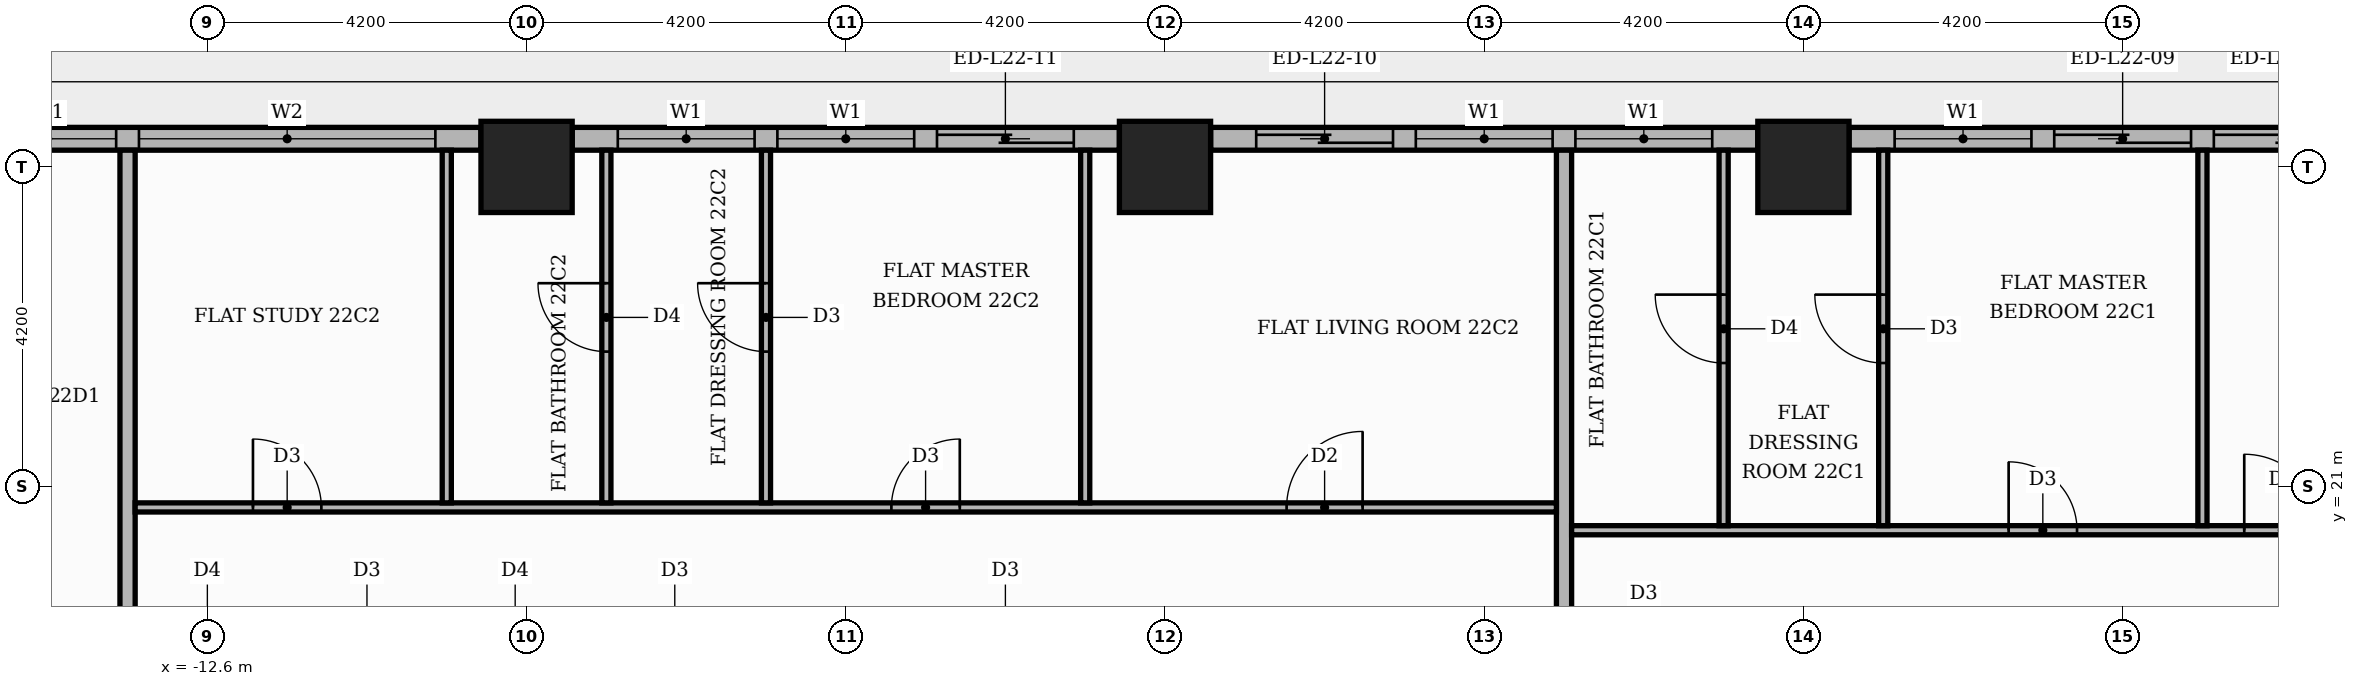
"""IFC4 building model, lengths in metres.
Left out: names, types, materials, properties, quantities, classifications, styles, units other than length and angle.
Written with IfcOpenShell. Run it as: python <this file> out.ifc"""

import sys

from ifc_helpers import new_model, si_unit, direction, frame, frame_2d, origin, origin_2d, place, context, subcontext, project, spatial, rectangle, extrude, element, fill, save


model = new_model("IFC4")
c1 = context("Model", 3, precision=1e-05, world=origin(), true_north=direction((0.0, 1.0)))
c2 = subcontext(c1, "Body", "Model", "MODEL_VIEW")
j1 = project(units=[si_unit("LENGTHUNIT", "METRE"), si_unit("PLANEANGLEUNIT", "RADIAN")], contexts=[c1])
p1 = place(None, origin())
s1 = spatial("IfcSite", under=j1, at=p1, CompositionType="ELEMENT")
p2 = place(p1, origin())
s2 = spatial("IfcBuilding", under=s1, at=p2, CompositionType="ELEMENT")
p3 = place(p2, frame((0.0, 0.0, 94.8)))
s3 = spatial("IfcBuildingStorey", under=s2, at=p3, CompositionType="ELEMENT", Elevation=94.8)
for number, where, z_axis, x_axis in (
    (1, (0.0, 25.2, 0.0), (0.0, 0.0, 1.0), (1.0, 0.0, 0.0)),
    (2, (-8.4, 25.2, 0.0), (0.0, 0.0, 1.0), (1.0, 0.0, 0.0)),
    (3, (8.4, 25.2, 0.0), (0.0, 0.0, 1.0), (1.0, 0.0, 0.0)),
):
    element("IfcColumn", number, at=place(p3, frame(where, z_axis=z_axis, x_axis=x_axis)), inside=s3, PredefinedType="COLUMN", context=c2, shape_type="SweptSolid", body=[
        extrude(rectangle(XDim=1.2, YDim=1.2, at=origin_2d()), origin(), (0.0, 0.0, 1.0), 3.9),
    ])
p4 = place(p3, frame((16.2, 25.57, 0.0), z_axis=(0.0, 0.0, 1.0), x_axis=(-1.0, 0.0, 0.0)))
e4 = element("IfcWall", 4, at=p4, inside=s3, PredefinedType="STANDARD", context=c2, shape_type="SweptSolid", body=[
    extrude(rectangle(XDim=7.2, YDim=0.3, at=frame_2d((3.6, 0.0))), origin(), (0.0, 0.0, 1.0), 3.48),
])
p5 = place(p4, frame((0.6, 0.0, 0.0)))
e5 = element("IfcOpeningElement", 5, at=p5, cuts=e4, PredefinedType="OPENING", context=c2, shape_type="SweptSolid", body=[
    extrude(rectangle(XDim=1.8, YDim=2.4, at=frame_2d((0.9, 1.2))), frame((0.0, 0.16, 0.0), z_axis=(0.0, -1.0, 0.0), x_axis=(1.0, 0.0, 0.0)), (0.0, 0.0, 1.0), 0.32),
])
p6 = place(p4, frame((2.7, 0.0, 0.0)))
e6 = element("IfcOpeningElement", 6, at=p6, cuts=e4, PredefinedType="OPENING", context=c2, shape_type="SweptSolid", body=[
    extrude(rectangle(XDim=1.8, YDim=2.4, at=frame_2d((0.9, 1.2))), frame((0.0, 0.16, 0.0), z_axis=(0.0, -1.0, 0.0), x_axis=(1.0, 0.0, 0.0)), (0.0, 0.0, 1.0), 0.32),
])
p7 = place(p4, frame((4.8, 0.0, 0.9)))
e7 = element("IfcOpeningElement", 7, at=p7, cuts=e4, PredefinedType="OPENING", context=c2, shape_type="SweptSolid", body=[
    extrude(rectangle(XDim=1.8, YDim=2.1, at=frame_2d((0.9, 1.05))), frame((0.0, 0.16, 0.0), z_axis=(0.0, -1.0, 0.0), x_axis=(1.0, 0.0, 0.0)), (0.0, 0.0, 1.0), 0.32),
])
p8 = place(p3, frame((7.8, 25.57, 0.0), z_axis=(0.0, 0.0, 1.0), x_axis=(-1.0, 0.0, 0.0)))
e8 = element("IfcWall", 8, at=p8, inside=s3, PredefinedType="STANDARD", context=c2, shape_type="SweptSolid", body=[
    extrude(rectangle(XDim=7.2, YDim=0.3, at=frame_2d((3.6, 0.0))), origin(), (0.0, 0.0, 1.0), 3.48),
])
p9 = place(p8, frame((0.6, 0.0, 0.9)))
e9 = element("IfcOpeningElement", 9, at=p9, cuts=e8, PredefinedType="OPENING", context=c2, shape_type="SweptSolid", body=[
    extrude(rectangle(XDim=1.8, YDim=2.1, at=frame_2d((0.9, 1.05))), frame((0.0, 0.16, 0.0), z_axis=(0.0, -1.0, 0.0), x_axis=(1.0, 0.0, 0.0)), (0.0, 0.0, 1.0), 0.32),
])
p10 = place(p8, frame((2.7, 0.0, 0.9)))
e10 = element("IfcOpeningElement", 10, at=p10, cuts=e8, PredefinedType="OPENING", context=c2, shape_type="SweptSolid", body=[
    extrude(rectangle(XDim=1.8, YDim=2.1, at=frame_2d((0.9, 1.05))), frame((0.0, 0.16, 0.0), z_axis=(0.0, -1.0, 0.0), x_axis=(1.0, 0.0, 0.0)), (0.0, 0.0, 1.0), 0.32),
])
p11 = place(p8, frame((4.8, 0.0, 0.0)))
e11 = element("IfcOpeningElement", 11, at=p11, cuts=e8, PredefinedType="OPENING", context=c2, shape_type="SweptSolid", body=[
    extrude(rectangle(XDim=1.8, YDim=2.4, at=frame_2d((0.9, 1.2))), frame((0.0, 0.16, 0.0), z_axis=(0.0, -1.0, 0.0), x_axis=(1.0, 0.0, 0.0)), (0.0, 0.0, 1.0), 0.32),
])
p12 = place(p3, frame((-0.6, 25.57, 0.0), z_axis=(0.0, 0.0, 1.0), x_axis=(-1.0, 0.0, 0.0)))
e12 = element("IfcWall", 12, at=p12, inside=s3, PredefinedType="STANDARD", context=c2, shape_type="SweptSolid", body=[
    extrude(rectangle(XDim=7.2, YDim=0.3, at=frame_2d((3.6, 0.0))), origin(), (0.0, 0.0, 1.0), 3.48),
])
p13 = place(p12, frame((0.6, 0.0, 0.0)))
e13 = element("IfcOpeningElement", 13, at=p13, cuts=e12, PredefinedType="OPENING", context=c2, shape_type="SweptSolid", body=[
    extrude(rectangle(XDim=1.8, YDim=2.4, at=frame_2d((0.9, 1.2))), frame((0.0, 0.16, 0.0), z_axis=(0.0, -1.0, 0.0), x_axis=(1.0, 0.0, 0.0)), (0.0, 0.0, 1.0), 0.32),
])
p14 = place(p12, frame((2.7, 0.0, 0.9)))
e14 = element("IfcOpeningElement", 14, at=p14, cuts=e12, PredefinedType="OPENING", context=c2, shape_type="SweptSolid", body=[
    extrude(rectangle(XDim=1.8, YDim=2.1, at=frame_2d((0.9, 1.05))), frame((0.0, 0.16, 0.0), z_axis=(0.0, -1.0, 0.0), x_axis=(1.0, 0.0, 0.0)), (0.0, 0.0, 1.0), 0.32),
])
p15 = place(p12, frame((4.8, 0.0, 0.9)))
e15 = element("IfcOpeningElement", 15, at=p15, cuts=e12, PredefinedType="OPENING", context=c2, shape_type="SweptSolid", body=[
    extrude(rectangle(XDim=1.8, YDim=2.1, at=frame_2d((0.9, 1.05))), frame((0.0, 0.16, 0.0), z_axis=(0.0, -1.0, 0.0), x_axis=(1.0, 0.0, 0.0)), (0.0, 0.0, 1.0), 0.32),
])
p16 = place(p3, frame((-9.0, 25.57, 0.0), z_axis=(0.0, 0.0, 1.0), x_axis=(-1.0, 0.0, 0.0)))
e16 = element("IfcWall", 16, at=p16, inside=s3, PredefinedType="STANDARD", context=c2, shape_type="SweptSolid", body=[
    extrude(rectangle(XDim=7.2, YDim=0.3, at=frame_2d((3.6, 0.0))), origin(), (0.0, 0.0, 1.0), 3.48),
])
p17 = place(p16, frame((0.6, 0.0, 0.9)))
e17 = element("IfcOpeningElement", 17, at=p17, cuts=e16, PredefinedType="OPENING", context=c2, shape_type="SweptSolid", body=[
    extrude(rectangle(XDim=3.9, YDim=2.1, at=frame_2d((1.95, 1.05))), frame((0.0, 0.16, 0.0), z_axis=(0.0, -1.0, 0.0), x_axis=(1.0, 0.0, 0.0)), (0.0, 0.0, 1.0), 0.32),
])
p18 = place(p16, frame((4.8, 0.0, 0.9)))
e18 = element("IfcOpeningElement", 18, at=p18, cuts=e16, PredefinedType="OPENING", context=c2, shape_type="SweptSolid", body=[
    extrude(rectangle(XDim=1.8, YDim=2.1, at=frame_2d((0.9, 1.05))), frame((0.0, 0.16, 0.0), z_axis=(0.0, -1.0, 0.0), x_axis=(1.0, 0.0, 0.0)), (0.0, 0.0, 1.0), 0.32),
])
for number, where, z_axis, x_axis in (
    (19, (-13.65, 13.75, 0.0), (0.0, 0.0, 1.0), (0.0, 1.0, 0.0)),
    (20, (5.25, 13.75, 0.0), (0.0, 0.0, 1.0), (0.0, 1.0, 0.0)),
):
    element("IfcWall", number, at=place(p3, frame(where, z_axis=z_axis, x_axis=x_axis)), inside=s3, PredefinedType="PARTITIONING", context=c2, shape_type="SweptSolid", body=[
        extrude(rectangle(XDim=11.67, YDim=0.2, at=frame_2d((5.835, 0.0))), origin(), (0.0, 0.0, 1.0), 3.48),
    ])
p19 = place(p3, frame((5.35, 20.42, 0.0), z_axis=(0.0, 0.0, 1.0), x_axis=(1.0, 0.0, 0.0)))
e21 = element("IfcWall", 21, at=p19, inside=s3, PredefinedType="PARTITIONING", context=c2, shape_type="SweptSolid", body=[
    extrude(rectangle(XDim=20.07, YDim=0.12, at=frame_2d((10.035, 0.0))), origin(), (0.0, 0.0, 1.0), 3.48),
])
p20 = place(p19, frame((8.85, 0.0, 0.0)))
e22 = element("IfcOpeningElement", 22, at=p20, cuts=e21, PredefinedType="OPENING", context=c2, shape_type="SweptSolid", body=[
    extrude(rectangle(XDim=1.0, YDim=2.1, at=frame_2d((0.5, 1.05))), frame((0.0, 0.07, 0.0), z_axis=(0.0, -1.0, 0.0), x_axis=(1.0, 0.0, 0.0)), (0.0, 0.0, 1.0), 0.14),
])
p21 = place(p19, frame((5.75, 0.0, 0.0)))
e23 = element("IfcOpeningElement", 23, at=p21, cuts=e21, PredefinedType="OPENING", context=c2, shape_type="SweptSolid", body=[
    extrude(rectangle(XDim=0.9, YDim=2.1, at=frame_2d((0.45, 1.05))), frame((0.0, 0.07, 0.0), z_axis=(0.0, -1.0, 0.0), x_axis=(1.0, 0.0, 0.0)), (0.0, 0.0, 1.0), 0.14),
])
p22 = place(p3, frame((7.35, 20.48, 0.0), z_axis=(0.0, 0.0, 1.0), x_axis=(0.0, 1.0, 0.0)))
e24 = element("IfcWall", 24, at=p22, inside=s3, PredefinedType="PARTITIONING", context=c2, shape_type="SweptSolid", body=[
    extrude(rectangle(XDim=4.94, YDim=0.12, at=frame_2d((2.47, 0.0))), origin(), (0.0, 0.0, 1.0), 3.48),
])
p23 = place(p22, frame((2.14, 0.0, 0.0)))
e25 = element("IfcOpeningElement", 25, at=p23, cuts=e24, PredefinedType="OPENING", context=c2, shape_type="SweptSolid", body=[
    extrude(rectangle(XDim=0.9, YDim=2.1, at=frame_2d((0.45, 1.05))), frame((0.0, 0.07, 0.0), z_axis=(0.0, -1.0, 0.0), x_axis=(1.0, 0.0, 0.0)), (0.0, 0.0, 1.0), 0.14),
])
p24 = place(p3, frame((9.45, 20.48, 0.0), z_axis=(0.0, 0.0, 1.0), x_axis=(0.0, 1.0, 0.0)))
e26 = element("IfcWall", 26, at=p24, inside=s3, PredefinedType="PARTITIONING", context=c2, shape_type="SweptSolid", body=[
    extrude(rectangle(XDim=4.94, YDim=0.12, at=frame_2d((2.47, 0.0))), origin(), (0.0, 0.0, 1.0), 3.48),
])
p25 = place(p24, frame((2.14, 0.0, 0.0)))
e27 = element("IfcOpeningElement", 27, at=p25, cuts=e26, PredefinedType="OPENING", context=c2, shape_type="SweptSolid", body=[
    extrude(rectangle(XDim=0.9, YDim=2.1, at=frame_2d((0.45, 1.05))), frame((0.0, 0.07, 0.0), z_axis=(0.0, -1.0, 0.0), x_axis=(1.0, 0.0, 0.0)), (0.0, 0.0, 1.0), 0.14),
])
p26 = place(p3, frame((13.65, 20.48, 0.0), z_axis=(0.0, 0.0, 1.0), x_axis=(0.0, 1.0, 0.0)))
e28 = element("IfcWall", 28, at=p26, inside=s3, PredefinedType="PARTITIONING", context=c2, shape_type="SweptSolid", body=[
    extrude(rectangle(XDim=4.94, YDim=0.12, at=frame_2d((2.47, 0.0))), origin(), (0.0, 0.0, 1.0), 3.48),
])
p27 = place(p3, frame((-13.55, 20.72, 0.0), z_axis=(0.0, 0.0, 1.0), x_axis=(1.0, 0.0, 0.0)))
e29 = element("IfcWall", 29, at=p27, inside=s3, PredefinedType="PARTITIONING", context=c2, shape_type="SweptSolid", body=[
    extrude(rectangle(XDim=18.7, YDim=0.12, at=frame_2d((9.35, 0.0))), origin(), (0.0, 0.0, 1.0), 3.48),
])
p28 = place(p27, frame((15.15, 0.0, 0.0)))
e30 = element("IfcOpeningElement", 30, at=p28, cuts=e29, PredefinedType="OPENING", context=c2, shape_type="SweptSolid", body=[
    extrude(rectangle(XDim=1.0, YDim=2.1, at=frame_2d((0.5, 1.05))), frame((0.0, 0.07, 0.0), z_axis=(0.0, -1.0, 0.0), x_axis=(1.0, 0.0, 0.0)), (0.0, 0.0, 1.0), 0.14),
])
p29 = place(p27, frame((9.95, 0.0, 0.0)))
e31 = element("IfcOpeningElement", 31, at=p29, cuts=e29, PredefinedType="OPENING", context=c2, shape_type="SweptSolid", body=[
    extrude(rectangle(XDim=0.9, YDim=2.1, at=frame_2d((0.45, 1.05))), frame((0.0, 0.07, 0.0), z_axis=(0.0, -1.0, 0.0), x_axis=(1.0, 0.0, 0.0)), (0.0, 0.0, 1.0), 0.14),
])
p30 = place(p27, frame((1.55, 0.0, 0.0)))
e32 = element("IfcOpeningElement", 32, at=p30, cuts=e29, PredefinedType="OPENING", context=c2, shape_type="SweptSolid", body=[
    extrude(rectangle(XDim=0.9, YDim=2.1, at=frame_2d((0.45, 1.05))), frame((0.0, 0.07, 0.0), z_axis=(0.0, -1.0, 0.0), x_axis=(1.0, 0.0, 0.0)), (0.0, 0.0, 1.0), 0.14),
])
p31 = place(p3, frame((-9.45, 20.78, 0.0), z_axis=(0.0, 0.0, 1.0), x_axis=(0.0, 1.0, 0.0)))
e33 = element("IfcWall", 33, at=p31, inside=s3, PredefinedType="PARTITIONING", context=c2, shape_type="SweptSolid", body=[
    extrude(rectangle(XDim=4.64, YDim=0.12, at=frame_2d((2.32, 0.0))), origin(), (0.0, 0.0, 1.0), 3.48),
])
p32 = place(p3, frame((-7.35, 20.78, 0.0), z_axis=(0.0, 0.0, 1.0), x_axis=(0.0, 1.0, 0.0)))
e34 = element("IfcWall", 34, at=p32, inside=s3, PredefinedType="PARTITIONING", context=c2, shape_type="SweptSolid", body=[
    extrude(rectangle(XDim=4.64, YDim=0.12, at=frame_2d((2.32, 0.0))), origin(), (0.0, 0.0, 1.0), 3.48),
])
p33 = place(p32, frame((1.99, 0.0, 0.0)))
e35 = element("IfcOpeningElement", 35, at=p33, cuts=e34, PredefinedType="OPENING", context=c2, shape_type="SweptSolid", body=[
    extrude(rectangle(XDim=0.9, YDim=2.1, at=frame_2d((0.45, 1.05))), frame((0.0, 0.07, 0.0), z_axis=(0.0, -1.0, 0.0), x_axis=(1.0, 0.0, 0.0)), (0.0, 0.0, 1.0), 0.14),
])
p34 = place(p3, frame((-5.25, 20.78, 0.0), z_axis=(0.0, 0.0, 1.0), x_axis=(0.0, 1.0, 0.0)))
e36 = element("IfcWall", 36, at=p34, inside=s3, PredefinedType="PARTITIONING", context=c2, shape_type="SweptSolid", body=[
    extrude(rectangle(XDim=4.64, YDim=0.12, at=frame_2d((2.32, 0.0))), origin(), (0.0, 0.0, 1.0), 3.48),
])
p35 = place(p34, frame((1.99, 0.0, 0.0)))
e37 = element("IfcOpeningElement", 37, at=p35, cuts=e36, PredefinedType="OPENING", context=c2, shape_type="SweptSolid", body=[
    extrude(rectangle(XDim=0.9, YDim=2.1, at=frame_2d((0.45, 1.05))), frame((0.0, 0.07, 0.0), z_axis=(0.0, -1.0, 0.0), x_axis=(1.0, 0.0, 0.0)), (0.0, 0.0, 1.0), 0.14),
])
p36 = place(p3, frame((-1.05, 20.78, 0.0), z_axis=(0.0, 0.0, 1.0), x_axis=(0.0, 1.0, 0.0)))
e38 = element("IfcWall", 38, at=p36, inside=s3, PredefinedType="PARTITIONING", context=c2, shape_type="SweptSolid", body=[
    extrude(rectangle(XDim=4.64, YDim=0.12, at=frame_2d((2.32, 0.0))), origin(), (0.0, 0.0, 1.0), 3.48),
])
p37 = place(p5, origin())
e39 = element("IfcDoor", 39, at=p37, inside=s3, OperationType="SLIDING_TO_LEFT", PredefinedType="DOOR", context=c2, shape_type="SweptSolid", body=[
    extrude(rectangle(XDim=1.8, YDim=2.4, at=frame_2d((0.9, 1.2))), frame((0.0, 0.025, 0.0), z_axis=(0.0, -1.0, 0.0), x_axis=(1.0, 0.0, 0.0)), (0.0, 0.0, 1.0), 0.05),
])
fill(e5, e39)
p38 = place(p6, origin())
e40 = element("IfcDoor", 40, at=p38, inside=s3, OperationType="SLIDING_TO_RIGHT", PredefinedType="DOOR", context=c2, shape_type="SweptSolid", body=[
    extrude(rectangle(XDim=1.8, YDim=2.4, at=frame_2d((0.9, 1.2))), frame((0.0, 0.025, 0.0), z_axis=(0.0, -1.0, 0.0), x_axis=(1.0, 0.0, 0.0)), (0.0, 0.0, 1.0), 0.05),
])
fill(e6, e40)
p39 = place(p7, origin())
e41 = element("IfcWindow", 41, at=p39, inside=s3, PartitioningType="SINGLE_PANEL", PredefinedType="WINDOW", context=c2, shape_type="SweptSolid", body=[
    extrude(rectangle(XDim=1.8, YDim=2.1, at=frame_2d((0.9, 1.05))), frame((0.0, 0.03, 0.0), z_axis=(0.0, -1.0, 0.0), x_axis=(1.0, 0.0, 0.0)), (0.0, 0.0, 1.0), 0.06),
])
fill(e7, e41)
p40 = place(p9, origin())
e42 = element("IfcWindow", 42, at=p40, inside=s3, PartitioningType="SINGLE_PANEL", PredefinedType="WINDOW", context=c2, shape_type="SweptSolid", body=[
    extrude(rectangle(XDim=1.8, YDim=2.1, at=frame_2d((0.9, 1.05))), frame((0.0, 0.03, 0.0), z_axis=(0.0, -1.0, 0.0), x_axis=(1.0, 0.0, 0.0)), (0.0, 0.0, 1.0), 0.06),
])
fill(e9, e42)
p41 = place(p10, origin())
e43 = element("IfcWindow", 43, at=p41, inside=s3, PartitioningType="SINGLE_PANEL", PredefinedType="WINDOW", context=c2, shape_type="SweptSolid", body=[
    extrude(rectangle(XDim=1.8, YDim=2.1, at=frame_2d((0.9, 1.05))), frame((0.0, 0.03, 0.0), z_axis=(0.0, -1.0, 0.0), x_axis=(1.0, 0.0, 0.0)), (0.0, 0.0, 1.0), 0.06),
])
fill(e10, e43)
p42 = place(p11, origin())
e44 = element("IfcDoor", 44, at=p42, inside=s3, OperationType="SLIDING_TO_RIGHT", PredefinedType="DOOR", context=c2, shape_type="SweptSolid", body=[
    extrude(rectangle(XDim=1.8, YDim=2.4, at=frame_2d((0.9, 1.2))), frame((0.0, 0.025, 0.0), z_axis=(0.0, -1.0, 0.0), x_axis=(1.0, 0.0, 0.0)), (0.0, 0.0, 1.0), 0.05),
])
fill(e11, e44)
p43 = place(p13, origin())
e45 = element("IfcDoor", 45, at=p43, inside=s3, OperationType="SLIDING_TO_LEFT", PredefinedType="DOOR", context=c2, shape_type="SweptSolid", body=[
    extrude(rectangle(XDim=1.8, YDim=2.4, at=frame_2d((0.9, 1.2))), frame((0.0, 0.025, 0.0), z_axis=(0.0, -1.0, 0.0), x_axis=(1.0, 0.0, 0.0)), (0.0, 0.0, 1.0), 0.05),
])
fill(e13, e45)
p44 = place(p14, origin())
e46 = element("IfcWindow", 46, at=p44, inside=s3, PartitioningType="SINGLE_PANEL", PredefinedType="WINDOW", context=c2, shape_type="SweptSolid", body=[
    extrude(rectangle(XDim=1.8, YDim=2.1, at=frame_2d((0.9, 1.05))), frame((0.0, 0.03, 0.0), z_axis=(0.0, -1.0, 0.0), x_axis=(1.0, 0.0, 0.0)), (0.0, 0.0, 1.0), 0.06),
])
fill(e14, e46)
p45 = place(p15, origin())
e47 = element("IfcWindow", 47, at=p45, inside=s3, PartitioningType="SINGLE_PANEL", PredefinedType="WINDOW", context=c2, shape_type="SweptSolid", body=[
    extrude(rectangle(XDim=1.8, YDim=2.1, at=frame_2d((0.9, 1.05))), frame((0.0, 0.03, 0.0), z_axis=(0.0, -1.0, 0.0), x_axis=(1.0, 0.0, 0.0)), (0.0, 0.0, 1.0), 0.06),
])
fill(e15, e47)
p46 = place(p17, origin())
e48 = element("IfcWindow", 48, at=p46, inside=s3, PartitioningType="SINGLE_PANEL", PredefinedType="WINDOW", context=c2, shape_type="SweptSolid", body=[
    extrude(rectangle(XDim=3.9, YDim=2.1, at=frame_2d((1.95, 1.05))), frame((0.0, 0.03, 0.0), z_axis=(0.0, -1.0, 0.0), x_axis=(1.0, 0.0, 0.0)), (0.0, 0.0, 1.0), 0.06),
])
fill(e17, e48)
p47 = place(p18, origin())
e49 = element("IfcWindow", 49, at=p47, inside=s3, PartitioningType="SINGLE_PANEL", PredefinedType="WINDOW", context=c2, shape_type="SweptSolid", body=[
    extrude(rectangle(XDim=1.8, YDim=2.1, at=frame_2d((0.9, 1.05))), frame((0.0, 0.03, 0.0), z_axis=(0.0, -1.0, 0.0), x_axis=(1.0, 0.0, 0.0)), (0.0, 0.0, 1.0), 0.06),
])
fill(e18, e49)
p48 = place(p20, origin())
e50 = element("IfcDoor", 50, at=p48, inside=s3, OperationType="SINGLE_SWING_LEFT", PredefinedType="DOOR", context=c2, shape_type="SweptSolid", body=[
    extrude(rectangle(XDim=1.0, YDim=2.1, at=frame_2d((0.5, 1.05))), frame((0.0, 0.025, 0.0), z_axis=(0.0, -1.0, 0.0), x_axis=(1.0, 0.0, 0.0)), (0.0, 0.0, 1.0), 0.05),
])
fill(e22, e50)
p49 = place(p21, origin())
e51 = element("IfcDoor", 51, at=p49, inside=s3, OperationType="SINGLE_SWING_LEFT", PredefinedType="DOOR", context=c2, shape_type="SweptSolid", body=[
    extrude(rectangle(XDim=0.9, YDim=2.1, at=frame_2d((0.45, 1.05))), frame((0.0, 0.025, 0.0), z_axis=(0.0, -1.0, 0.0), x_axis=(1.0, 0.0, 0.0)), (0.0, 0.0, 1.0), 0.05),
])
fill(e23, e51)
p50 = place(p25, origin())
e52 = element("IfcDoor", 52, at=p50, inside=s3, OperationType="SINGLE_SWING_RIGHT", PredefinedType="DOOR", context=c2, shape_type="SweptSolid", body=[
    extrude(rectangle(XDim=0.9, YDim=2.1, at=frame_2d((0.45, 1.05))), frame((0.0, 0.025, 0.0), z_axis=(0.0, -1.0, 0.0), x_axis=(1.0, 0.0, 0.0)), (0.0, 0.0, 1.0), 0.05),
])
fill(e27, e52)
p51 = place(p23, origin())
e53 = element("IfcDoor", 53, at=p51, inside=s3, OperationType="SINGLE_SWING_RIGHT", PredefinedType="DOOR", context=c2, shape_type="SweptSolid", body=[
    extrude(rectangle(XDim=0.9, YDim=2.1, at=frame_2d((0.45, 1.05))), frame((0.0, 0.025, 0.0), z_axis=(0.0, -1.0, 0.0), x_axis=(1.0, 0.0, 0.0)), (0.0, 0.0, 1.0), 0.05),
])
fill(e25, e53)
p52 = place(p28, origin())
e54 = element("IfcDoor", 54, at=p52, inside=s3, OperationType="SINGLE_SWING_RIGHT", PredefinedType="DOOR", context=c2, shape_type="SweptSolid", body=[
    extrude(rectangle(XDim=1.0, YDim=2.1, at=frame_2d((0.5, 1.05))), frame((0.0, 0.025, 0.0), z_axis=(0.0, -1.0, 0.0), x_axis=(1.0, 0.0, 0.0)), (0.0, 0.0, 1.0), 0.05),
])
fill(e30, e54)
p53 = place(p29, origin())
e55 = element("IfcDoor", 55, at=p53, inside=s3, OperationType="SINGLE_SWING_RIGHT", PredefinedType="DOOR", context=c2, shape_type="SweptSolid", body=[
    extrude(rectangle(XDim=0.9, YDim=2.1, at=frame_2d((0.45, 1.05))), frame((0.0, 0.025, 0.0), z_axis=(0.0, -1.0, 0.0), x_axis=(1.0, 0.0, 0.0)), (0.0, 0.0, 1.0), 0.05),
])
fill(e31, e55)
p54 = place(p35, origin())
e56 = element("IfcDoor", 56, at=p54, inside=s3, OperationType="SINGLE_SWING_RIGHT", PredefinedType="DOOR", context=c2, shape_type="SweptSolid", body=[
    extrude(rectangle(XDim=0.9, YDim=2.1, at=frame_2d((0.45, 1.05))), frame((0.0, 0.025, 0.0), z_axis=(0.0, -1.0, 0.0), x_axis=(1.0, 0.0, 0.0)), (0.0, 0.0, 1.0), 0.05),
])
fill(e37, e56)
p55 = place(p33, origin())
e57 = element("IfcDoor", 57, at=p55, inside=s3, OperationType="SINGLE_SWING_RIGHT", PredefinedType="DOOR", context=c2, shape_type="SweptSolid", body=[
    extrude(rectangle(XDim=0.9, YDim=2.1, at=frame_2d((0.45, 1.05))), frame((0.0, 0.025, 0.0), z_axis=(0.0, -1.0, 0.0), x_axis=(1.0, 0.0, 0.0)), (0.0, 0.0, 1.0), 0.05),
])
fill(e35, e57)
p56 = place(p30, origin())
e58 = element("IfcDoor", 58, at=p56, inside=s3, OperationType="SINGLE_SWING_LEFT", PredefinedType="DOOR", context=c2, shape_type="SweptSolid", body=[
    extrude(rectangle(XDim=0.9, YDim=2.1, at=frame_2d((0.45, 1.05))), frame((0.0, 0.025, 0.0), z_axis=(0.0, -1.0, 0.0), x_axis=(1.0, 0.0, 0.0)), (0.0, 0.0, 1.0), 0.05),
])
fill(e32, e58)
save(model, sys.argv[1])
